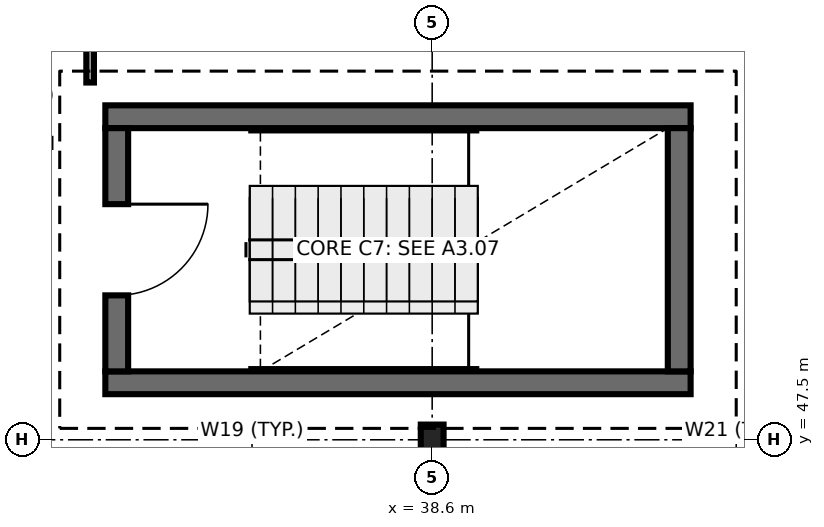
"""IFC4 building model, lengths in metres.
Left out: names, types, materials, properties, quantities, classifications, styles, units other than length and angle.
Written with IfcOpenShell. Run it as: python <this file> out.ifc"""

import sys

from ifc_helpers import new_model, si_unit, direction, frame, frame_2d, origin, origin_2d, place, context, subcontext, project, spatial, rectangle, i_section, extrude, element, fill, save


model = new_model("IFC4")
c1 = context("Model", 3, precision=1e-05, world=origin(), true_north=direction((0.0, 1.0)))
c2 = subcontext(c1, "Body", "Model", "MODEL_VIEW")
j1 = project(units=[si_unit("LENGTHUNIT", "METRE"), si_unit("PLANEANGLEUNIT", "RADIAN")], contexts=[c1])
p1 = place(None, origin())
s1 = spatial("IfcSite", under=j1, at=p1, CompositionType="ELEMENT")
p2 = place(p1, origin())
s2 = spatial("IfcBuilding", under=s1, at=p2, CompositionType="ELEMENT")
p3 = place(p2, frame((0.0, 0.0, 22.8)))
s3 = spatial("IfcBuildingStorey", under=s2, at=p3, CompositionType="ELEMENT", Elevation=22.8)
p4 = place(p3, frame((38.6, 47.5, 0.0), z_axis=(0.0, 0.0, 1.0), x_axis=(1.0, 0.0, 0.0)))
e1 = element("IfcColumn", 1, at=p4, inside=s3, PredefinedType="COLUMN", context=c2, shape_type="SweptSolid", body=[
    extrude(i_section(OverallWidth=0.3, OverallDepth=0.4, WebThickness=0.013, FlangeThickness=0.024, FilletRadius=0.027, at=origin_2d()), origin(), (0.0, 0.0, 1.0), 3.9),
])
for number, where, z_axis, x_axis in (
    (2, (34.3, 48.25, 0.0), (0.0, 0.0, 1.0), (1.0, 0.0, 0.0)),
    (3, (42.0, 51.75, 0.0), (0.0, 0.0, 1.0), (-1.0, 0.0, 0.0)),
):
    element("IfcWall", number, at=place(p3, frame(where, z_axis=z_axis, x_axis=x_axis)), inside=s3, PredefinedType="SHEAR", context=c2, shape_type="SweptSolid", body=[
        extrude(rectangle(XDim=7.7, YDim=0.3, at=frame_2d((3.85, 0.0))), origin(), (0.0, 0.0, 1.0), 3.9),
    ])
p5 = place(p3, frame((34.45, 51.6, 0.0), z_axis=(0.0, 0.0, 1.0), x_axis=(0.0, -1.0, 0.0)))
e4 = element("IfcWall", 4, at=p5, inside=s3, PredefinedType="SHEAR", context=c2, shape_type="SweptSolid", body=[
    extrude(rectangle(XDim=3.2, YDim=0.3, at=frame_2d((1.6, 0.0))), origin(), (0.0, 0.0, 1.0), 3.9),
])
p6 = place(p5, frame((1.0, 0.0, 0.0)))
e5 = element("IfcOpeningElement", 5, at=p6, cuts=e4, PredefinedType="OPENING", context=c2, shape_type="SweptSolid", body=[
    extrude(rectangle(XDim=1.2, YDim=2.15, at=frame_2d((0.6, 1.075))), frame((0.0, 0.16, 0.0), z_axis=(0.0, -1.0, 0.0), x_axis=(1.0, 0.0, 0.0)), (0.0, 0.0, 1.0), 0.32),
])
p7 = place(p3, frame((41.85, 48.4, 0.0), z_axis=(0.0, 0.0, 1.0), x_axis=(0.0, 1.0, 0.0)))
e6 = element("IfcWall", 6, at=p7, inside=s3, PredefinedType="SHEAR", context=c2, shape_type="SweptSolid", body=[
    extrude(rectangle(XDim=3.2, YDim=0.3, at=frame_2d((1.6, 0.0))), origin(), (0.0, 0.0, 1.0), 3.9),
])
p8 = place(p3, frame((34.1, 52.2, 0.0), z_axis=(0.0, 0.0, 1.0), x_axis=(0.0, 1.0, 0.0)))
e7 = element("IfcWall", 7, at=p8, inside=s3, PredefinedType="PARTITIONING", context=c2, shape_type="SweptSolid", body=[
    extrude(rectangle(XDim=5.4, YDim=0.1, at=frame_2d((2.7, 0.0))), origin(), (0.0, 0.0, 1.0), 3.68),
])
p9 = place(p8, frame((2.225, 0.0, 0.0)))
e8 = element("IfcOpeningElement", 8, at=p9, cuts=e7, PredefinedType="OPENING", context=c2, shape_type="SweptSolid", body=[
    extrude(rectangle(XDim=0.95, YDim=2.1, at=frame_2d((0.475, 1.05))), frame((0.0, 0.06, 0.0), z_axis=(0.0, -1.0, 0.0), x_axis=(1.0, 0.0, 0.0)), (0.0, 0.0, 1.0), 0.12),
])
p10 = place(p6, origin())
e9 = element("IfcDoor", 9, at=p10, inside=s3, OperationType="SINGLE_SWING_LEFT", PredefinedType="DOOR", context=c2, shape_type="SweptSolid", body=[
    extrude(rectangle(XDim=1.2, YDim=2.15, at=frame_2d((0.6, 1.075))), frame((0.0, 0.025, 0.0), z_axis=(0.0, -1.0, 0.0), x_axis=(1.0, 0.0, 0.0)), (0.0, 0.0, 1.0), 0.05),
])
fill(e5, e9)
save(model, sys.argv[1])
